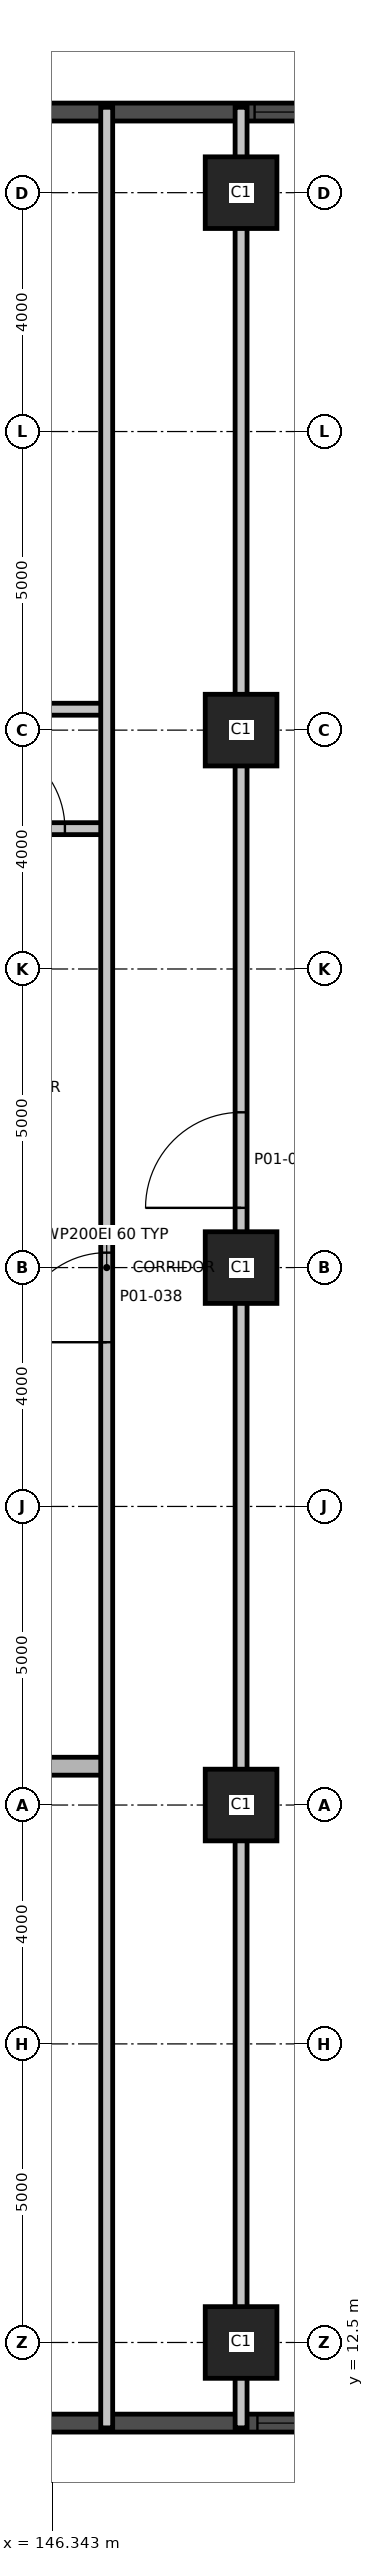
"""IFC4 building model, lengths in metres.
Left out: names, types, materials, properties, quantities, classifications, styles, units other than length and angle.
Written with IfcOpenShell. Run it as: python <this file> out.ifc"""

import sys

from ifc_helpers import new_model, si_unit, direction, frame, frame_2d, origin, origin_2d, place, context, subcontext, project, spatial, rectangle, extrude, element, fill, save


model = new_model("IFC4")
c1 = context("Model", 3, precision=1e-05, world=origin(), true_north=direction((0.0, 1.0)))
c2 = subcontext(c1, "Body", "Model", "MODEL_VIEW")
j1 = project(units=[si_unit("LENGTHUNIT", "METRE"), si_unit("PLANEANGLEUNIT", "RADIAN")], contexts=[c1])
p1 = place(None, origin())
s1 = spatial("IfcSite", under=j1, at=p1, CompositionType="ELEMENT")
p2 = place(p1, origin())
s2 = spatial("IfcBuilding", under=s1, at=p2, CompositionType="ELEMENT")
p3 = place(p2, frame((0.0, 0.0, 8.0)))
s3 = spatial("IfcBuildingStorey", under=s2, at=p3, CompositionType="ELEMENT", Elevation=8.0)
for number, where, z_axis, x_axis in (
    (1, (149.5, 12.5, 0.0), (0.0, 0.0, 1.0), (1.0, 0.0, 0.0)),
    (2, (149.5, 21.5, 0.0), (0.0, 0.0, 1.0), (1.0, 0.0, 0.0)),
    (3, (149.5, 30.5, 0.0), (0.0, 0.0, 1.0), (1.0, 0.0, 0.0)),
    (4, (149.5, 39.5, 0.0), (0.0, 0.0, 1.0), (1.0, 0.0, 0.0)),
    (5, (149.5, 48.5, 0.0), (0.0, 0.0, 1.0), (1.0, 0.0, 0.0)),
):
    element("IfcColumn", number, at=place(p3, frame(where, z_axis=z_axis, x_axis=x_axis)), inside=s3, PredefinedType="COLUMN", context=c2, shape_type="SweptSolid", body=[
        extrude(rectangle(XDim=1.2, YDim=1.2, at=origin_2d()), origin(), (0.0, 0.0, 1.0), 5.5),
    ])
p4 = place(p3, frame((118.048, 11.15, 0.0), z_axis=(0.0, 0.0, 1.0), x_axis=(1.0, 0.0, 0.0)))
e6 = element("IfcWall", 6, at=p4, inside=s3, PredefinedType="SOLIDWALL", context=c2, shape_type="SweptSolid", body=[
    extrude(rectangle(XDim=35.88, YDim=0.3, at=frame_2d((17.94, 0.0))), origin(), (0.0, 0.0, 1.0), 5.2),
])
p5 = place(p4, frame((4.202, 0.0, 0.9)))
e7 = element("IfcOpeningElement", 7, at=p5, cuts=e6, PredefinedType="OPENING", context=c2, shape_type="SweptSolid", body=[
    extrude(rectangle(XDim=3.0, YDim=2.4, at=frame_2d((1.5, 1.2))), frame((0.0, 0.16, 0.0), z_axis=(0.0, -1.0, 0.0), x_axis=(1.0, 0.0, 0.0)), (0.0, 0.0, 1.0), 0.32),
])
p6 = place(p4, frame((8.702, 0.0, 0.9)))
e8 = element("IfcOpeningElement", 8, at=p6, cuts=e6, PredefinedType="OPENING", context=c2, shape_type="SweptSolid", body=[
    extrude(rectangle(XDim=3.0, YDim=2.4, at=frame_2d((1.5, 1.2))), frame((0.0, 0.16, 0.0), z_axis=(0.0, -1.0, 0.0), x_axis=(1.0, 0.0, 0.0)), (0.0, 0.0, 1.0), 0.32),
])
p7 = place(p4, frame((13.202, 0.0, 0.9)))
e9 = element("IfcOpeningElement", 9, at=p7, cuts=e6, PredefinedType="OPENING", context=c2, shape_type="SweptSolid", body=[
    extrude(rectangle(XDim=3.0, YDim=2.4, at=frame_2d((1.5, 1.2))), frame((0.0, 0.16, 0.0), z_axis=(0.0, -1.0, 0.0), x_axis=(1.0, 0.0, 0.0)), (0.0, 0.0, 1.0), 0.32),
])
p8 = place(p4, frame((17.702, 0.0, 0.9)))
e10 = element("IfcOpeningElement", 10, at=p8, cuts=e6, PredefinedType="OPENING", context=c2, shape_type="SweptSolid", body=[
    extrude(rectangle(XDim=3.0, YDim=2.4, at=frame_2d((1.5, 1.2))), frame((0.0, 0.16, 0.0), z_axis=(0.0, -1.0, 0.0), x_axis=(1.0, 0.0, 0.0)), (0.0, 0.0, 1.0), 0.32),
])
p9 = place(p4, frame((22.202, 0.0, 0.9)))
e11 = element("IfcOpeningElement", 11, at=p9, cuts=e6, PredefinedType="OPENING", context=c2, shape_type="SweptSolid", body=[
    extrude(rectangle(XDim=3.0, YDim=2.4, at=frame_2d((1.5, 1.2))), frame((0.0, 0.16, 0.0), z_axis=(0.0, -1.0, 0.0), x_axis=(1.0, 0.0, 0.0)), (0.0, 0.0, 1.0), 0.32),
])
p10 = place(p4, frame((31.726, 0.0, 0.9)))
e12 = element("IfcOpeningElement", 12, at=p10, cuts=e6, PredefinedType="OPENING", context=c2, shape_type="SweptSolid", body=[
    extrude(rectangle(XDim=3.0, YDim=2.4, at=frame_2d((1.5, 1.2))), frame((0.0, 0.16, 0.0), z_axis=(0.0, -1.0, 0.0), x_axis=(1.0, 0.0, 0.0)), (0.0, 0.0, 1.0), 0.32),
])
p11 = place(p3, frame((153.952, 49.85, 0.0), z_axis=(0.0, 0.0, 1.0), x_axis=(-1.0, 0.0, 0.0)))
e13 = element("IfcWall", 13, at=p11, inside=s3, PredefinedType="SOLIDWALL", context=c2, shape_type="SweptSolid", body=[
    extrude(rectangle(XDim=35.88, YDim=0.3, at=frame_2d((17.94, 0.0))), origin(), (0.0, 0.0, 1.0), 5.2),
])
p12 = place(p11, frame((1.226, 0.0, 0.9)))
e14 = element("IfcOpeningElement", 14, at=p12, cuts=e13, PredefinedType="OPENING", context=c2, shape_type="SweptSolid", body=[
    extrude(rectangle(XDim=3.0, YDim=2.4, at=frame_2d((1.5, 1.2))), frame((0.0, 0.16, 0.0), z_axis=(0.0, -1.0, 0.0), x_axis=(1.0, 0.0, 0.0)), (0.0, 0.0, 1.0), 0.32),
])
p13 = place(p11, frame((10.702, 0.0, 0.9)))
e15 = element("IfcOpeningElement", 15, at=p13, cuts=e13, PredefinedType="OPENING", context=c2, shape_type="SweptSolid", body=[
    extrude(rectangle(XDim=3.0, YDim=2.4, at=frame_2d((1.5, 1.2))), frame((0.0, 0.16, 0.0), z_axis=(0.0, -1.0, 0.0), x_axis=(1.0, 0.0, 0.0)), (0.0, 0.0, 1.0), 0.32),
])
p14 = place(p11, frame((19.702, 0.0, 0.9)))
e16 = element("IfcOpeningElement", 16, at=p14, cuts=e13, PredefinedType="OPENING", context=c2, shape_type="SweptSolid", body=[
    extrude(rectangle(XDim=3.0, YDim=2.4, at=frame_2d((1.5, 1.2))), frame((0.0, 0.16, 0.0), z_axis=(0.0, -1.0, 0.0), x_axis=(1.0, 0.0, 0.0)), (0.0, 0.0, 1.0), 0.32),
])
p15 = place(p11, frame((24.202, 0.0, 0.9)))
e17 = element("IfcOpeningElement", 17, at=p15, cuts=e13, PredefinedType="OPENING", context=c2, shape_type="SweptSolid", body=[
    extrude(rectangle(XDim=3.0, YDim=2.4, at=frame_2d((1.5, 1.2))), frame((0.0, 0.16, 0.0), z_axis=(0.0, -1.0, 0.0), x_axis=(1.0, 0.0, 0.0)), (0.0, 0.0, 1.0), 0.32),
])
p16 = place(p11, frame((28.702, 0.0, 0.9)))
e18 = element("IfcOpeningElement", 18, at=p16, cuts=e13, PredefinedType="OPENING", context=c2, shape_type="SweptSolid", body=[
    extrude(rectangle(XDim=3.0, YDim=2.4, at=frame_2d((1.5, 1.2))), frame((0.0, 0.16, 0.0), z_axis=(0.0, -1.0, 0.0), x_axis=(1.0, 0.0, 0.0)), (0.0, 0.0, 1.0), 0.32),
])
p17 = place(p3, frame((125.75, 22.15, 0.0), z_axis=(0.0, 0.0, 1.0), x_axis=(1.0, 0.0, 0.0)))
e19 = element("IfcWall", 19, at=p17, inside=s3, PredefinedType="SHEAR", context=c2, shape_type="SweptSolid", body=[
    extrude(rectangle(XDim=21.5, YDim=0.3, at=frame_2d((10.75, 0.0))), origin(), (0.0, 0.0, 1.0), 5.2),
])
p18 = place(p17, frame((17.0, 0.0, 0.0)))
e20 = element("IfcOpeningElement", 20, at=p18, cuts=e19, PredefinedType="OPENING", context=c2, shape_type="SweptSolid", body=[
    extrude(rectangle(XDim=1.0, YDim=2.1, at=frame_2d((0.5, 1.05))), frame((0.0, 0.16, 0.0), z_axis=(0.0, -1.0, 0.0), x_axis=(1.0, 0.0, 0.0)), (0.0, 0.0, 1.0), 0.32),
])
p19 = place(p17, frame((6.75, 0.0, 0.0)))
e21 = element("IfcOpeningElement", 21, at=p19, cuts=e19, PredefinedType="OPENING", context=c2, shape_type="SweptSolid", body=[
    extrude(rectangle(XDim=1.6, YDim=2.1, at=frame_2d((0.8, 1.05))), frame((0.0, 0.16, 0.0), z_axis=(0.0, -1.0, 0.0), x_axis=(1.0, 0.0, 0.0)), (0.0, 0.0, 1.0), 0.32),
])
p20 = place(p3, frame((144.02, 37.85, 0.0), z_axis=(0.0, 0.0, 1.0), x_axis=(1.0, 0.0, 0.0)))
e22 = element("IfcWall", 22, at=p20, inside=s3, PredefinedType="PARTITIONING", context=c2, shape_type="SweptSolid", body=[
    extrude(rectangle(XDim=3.23, YDim=0.2, at=frame_2d((1.615, 0.0))), origin(), (0.0, 0.0, 1.0), 5.2),
])
p21 = place(p20, frame((1.03, 0.0, 0.0)))
e23 = element("IfcOpeningElement", 23, at=p21, cuts=e22, PredefinedType="OPENING", context=c2, shape_type="SweptSolid", body=[
    extrude(rectangle(XDim=1.5, YDim=2.1, at=frame_2d((0.75, 1.05))), frame((0.0, 0.11, 0.0), z_axis=(0.0, -1.0, 0.0), x_axis=(1.0, 0.0, 0.0)), (0.0, 0.0, 1.0), 0.22),
])
p22 = place(p3, frame((143.0, 39.85, 0.0), z_axis=(0.0, 0.0, 1.0), x_axis=(1.0, 0.0, 0.0)))
e24 = element("IfcWall", 24, at=p22, inside=s3, PredefinedType="PARTITIONING", context=c2, shape_type="SweptSolid", body=[
    extrude(rectangle(XDim=4.25, YDim=0.2, at=frame_2d((2.125, 0.0))), origin(), (0.0, 0.0, 1.0), 5.2),
])
p23 = place(p3, frame((147.25, 11.07, 0.0), z_axis=(0.0, 0.0, 1.0), x_axis=(0.0, 1.0, 0.0)))
e25 = element("IfcWall", 25, at=p23, inside=s3, PredefinedType="PARTITIONING", context=c2, shape_type="SweptSolid", body=[
    extrude(rectangle(XDim=38.86, YDim=0.2, at=frame_2d((19.43, 0.0))), origin(), (0.0, 0.0, 1.0), 5.2),
])
p24 = place(p23, frame((18.18, 0.0, 0.0)))
e26 = element("IfcOpeningElement", 26, at=p24, cuts=e25, PredefinedType="OPENING", context=c2, shape_type="SweptSolid", body=[
    extrude(rectangle(XDim=1.5, YDim=2.1, at=frame_2d((0.75, 1.05))), frame((0.0, 0.11, 0.0), z_axis=(0.0, -1.0, 0.0), x_axis=(1.0, 0.0, 0.0)), (0.0, 0.0, 1.0), 0.22),
])
p25 = place(p3, frame((149.5, 11.07, 0.0), z_axis=(0.0, 0.0, 1.0), x_axis=(0.0, 1.0, 0.0)))
e27 = element("IfcWall", 27, at=p25, inside=s3, PredefinedType="PARTITIONING", context=c2, shape_type="SweptSolid", body=[
    extrude(rectangle(XDim=38.86, YDim=0.2, at=frame_2d((19.43, 0.0))), origin(), (0.0, 0.0, 1.0), 5.2),
])
p26 = place(p25, frame((20.43, 0.0, 0.0)))
e28 = element("IfcOpeningElement", 28, at=p26, cuts=e27, PredefinedType="OPENING", context=c2, shape_type="SweptSolid", body=[
    extrude(rectangle(XDim=1.6, YDim=2.1, at=frame_2d((0.8, 1.05))), frame((0.0, 0.11, 0.0), z_axis=(0.0, -1.0, 0.0), x_axis=(1.0, 0.0, 0.0)), (0.0, 0.0, 1.0), 0.22),
])
p27 = place(p10, origin())
e29 = element("IfcWindow", 29, at=p27, inside=s3, PartitioningType="SINGLE_PANEL", PredefinedType="WINDOW", context=c2, shape_type="SweptSolid", body=[
    extrude(rectangle(XDim=3.0, YDim=2.4, at=frame_2d((1.5, 1.2))), frame((0.0, 0.03, 0.0), z_axis=(0.0, -1.0, 0.0), x_axis=(1.0, 0.0, 0.0)), (0.0, 0.0, 1.0), 0.06),
])
fill(e12, e29)
p28 = place(p12, origin())
e30 = element("IfcWindow", 30, at=p28, inside=s3, PartitioningType="SINGLE_PANEL", PredefinedType="WINDOW", context=c2, shape_type="SweptSolid", body=[
    extrude(rectangle(XDim=3.0, YDim=2.4, at=frame_2d((1.5, 1.2))), frame((0.0, 0.03, 0.0), z_axis=(0.0, -1.0, 0.0), x_axis=(1.0, 0.0, 0.0)), (0.0, 0.0, 1.0), 0.06),
])
fill(e14, e30)
p29 = place(p21, origin())
e31 = element("IfcDoor", 31, at=p29, inside=s3, OperationType="SINGLE_SWING_LEFT", PredefinedType="DOOR", context=c2, shape_type="SweptSolid", body=[
    extrude(rectangle(XDim=1.5, YDim=2.1, at=frame_2d((0.75, 1.05))), frame((0.0, 0.025, 0.0), z_axis=(0.0, -1.0, 0.0), x_axis=(1.0, 0.0, 0.0)), (0.0, 0.0, 1.0), 0.05),
])
fill(e23, e31)
p30 = place(p24, origin())
e32 = element("IfcDoor", 32, at=p30, inside=s3, OperationType="SINGLE_SWING_RIGHT", PredefinedType="DOOR", context=c2, shape_type="SweptSolid", body=[
    extrude(rectangle(XDim=1.5, YDim=2.1, at=frame_2d((0.75, 1.05))), frame((0.0, 0.025, 0.0), z_axis=(0.0, -1.0, 0.0), x_axis=(1.0, 0.0, 0.0)), (0.0, 0.0, 1.0), 0.05),
])
fill(e26, e32)
p31 = place(p26, origin())
e33 = element("IfcDoor", 33, at=p31, inside=s3, OperationType="SINGLE_SWING_RIGHT", PredefinedType="DOOR", context=c2, shape_type="SweptSolid", body=[
    extrude(rectangle(XDim=1.6, YDim=2.1, at=frame_2d((0.8, 1.05))), frame((0.0, 0.025, 0.0), z_axis=(0.0, -1.0, 0.0), x_axis=(1.0, 0.0, 0.0)), (0.0, 0.0, 1.0), 0.05),
])
fill(e28, e33)
save(model, sys.argv[1])
